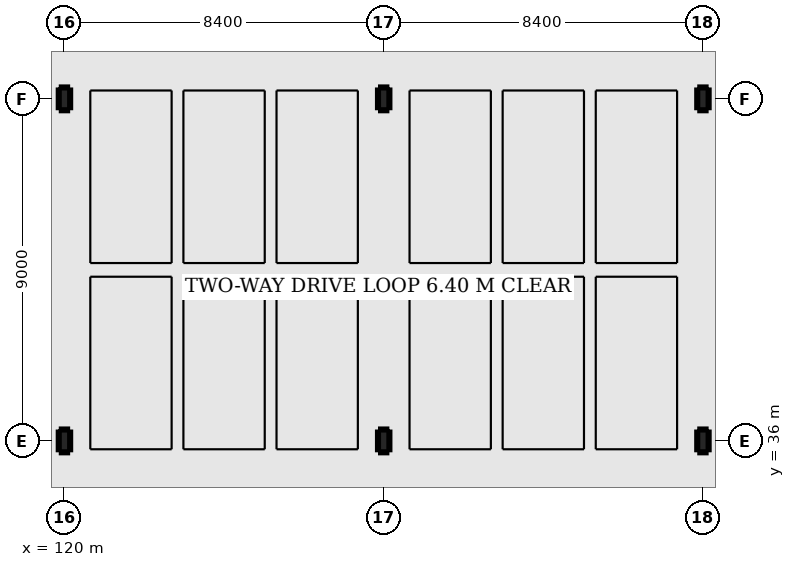
"""IFC4 building model, lengths in metres.
Left out: names, types, materials, properties, quantities, classifications, styles, units other than length and angle.
Written with IfcOpenShell. Run it as: python <this file> out.ifc"""

import sys

from ifc_helpers import new_model, si_unit, direction, frame, origin, origin_2d, place, context, subcontext, project, spatial, i_section, extrude, element, save


model = new_model("IFC4")
c1 = context("Model", 3, precision=1e-05, world=origin(), true_north=direction((0.0, 1.0)))
c2 = subcontext(c1, "Body", "Model", "MODEL_VIEW")
j1 = project(units=[si_unit("LENGTHUNIT", "METRE"), si_unit("PLANEANGLEUNIT", "RADIAN")], contexts=[c1])
p1 = place(None, origin())
s1 = spatial("IfcSite", under=j1, at=p1, CompositionType="ELEMENT")
p2 = place(p1, origin())
s2 = spatial("IfcBuilding", under=s1, at=p2, CompositionType="ELEMENT")
p3 = place(p2, frame((0.0, 0.0, -4.8)))
s3 = spatial("IfcBuildingStorey", under=s2, at=p3, CompositionType="ELEMENT", Elevation=-4.8)
for number, where, z_axis, x_axis in (
    (1, (120.0, 36.0, 0.0), (0.0, 0.0, 1.0), (1.0, 0.0, 0.0)),
    (2, (120.0, 45.0, 0.0), (0.0, 0.0, 1.0), (1.0, 0.0, 0.0)),
    (3, (128.4, 36.0, 0.0), (0.0, 0.0, 1.0), (1.0, 0.0, 0.0)),
    (4, (128.4, 45.0, 0.0), (0.0, 0.0, 1.0), (1.0, 0.0, 0.0)),
    (5, (136.8, 36.0, 0.0), (0.0, 0.0, 1.0), (1.0, 0.0, 0.0)),
    (6, (136.8, 45.0, 0.0), (0.0, 0.0, 1.0), (1.0, 0.0, 0.0)),
):
    element("IfcColumn", number, at=place(p3, frame(where, z_axis=z_axis, x_axis=x_axis)), inside=s3, PredefinedType="COLUMN", context=c2, shape_type="SweptSolid", body=[
        extrude(i_section(OverallWidth=0.3, OverallDepth=0.6, WebThickness=0.015, FlangeThickness=0.03, FilletRadius=0.027, at=origin_2d()), origin(), (0.0, 0.0, 1.0), 4.8),
    ])
save(model, sys.argv[1])
